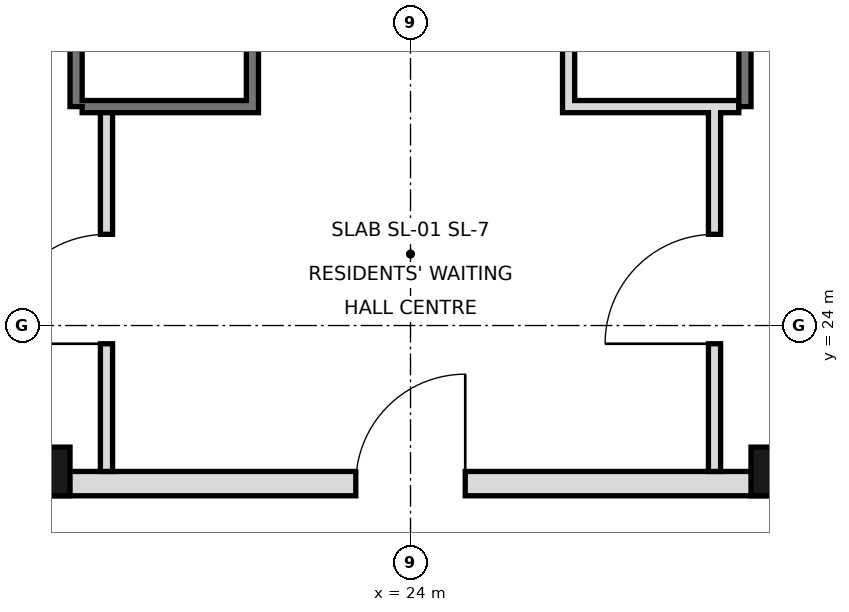
"""IFC4 building model, lengths in metres.
Left out: names, types, materials, properties, quantities, classifications, styles, units other than length and angle.
Written with IfcOpenShell. Run it as: python <this file> out.ifc"""

import sys

from ifc_helpers import new_model, si_unit, direction, frame, frame_2d, origin, origin_2d, place, context, subcontext, project, spatial, rectangle, hollow_rectangle, extrude, element, fill, save


model = new_model("IFC4")
c1 = context("Model", 3, precision=1e-05, world=origin(), true_north=direction((0.0, 1.0)))
c2 = subcontext(c1, "Body", "Model", "MODEL_VIEW")
j1 = project(units=[si_unit("LENGTHUNIT", "METRE"), si_unit("PLANEANGLEUNIT", "RADIAN")], contexts=[c1])
p1 = place(None, origin())
s1 = spatial("IfcSite", under=j1, at=p1, CompositionType="ELEMENT")
p2 = place(p1, origin())
s2 = spatial("IfcBuilding", under=s1, at=p2, CompositionType="ELEMENT")
p3 = place(p2, frame((0.0, 0.0, 85.8)))
s3 = spatial("IfcBuildingStorey", under=s2, at=p3, CompositionType="ELEMENT", Elevation=85.8)
for number, where, z_axis, x_axis in (
    (1, (18.0, 21.6, 0.0), (0.0, 0.0, 1.0), (1.0, 0.0, 0.0)),
    (2, (30.0, 21.6, 0.0), (0.0, 0.0, 1.0), (1.0, 0.0, 0.0)),
):
    element("IfcColumn", number, at=place(p3, frame(where, z_axis=z_axis, x_axis=x_axis)), inside=s3, PredefinedType="COLUMN", context=c2, shape_type="SweptSolid", body=[
        extrude(hollow_rectangle(XDim=0.8, YDim=0.8, WallThickness=0.06, at=origin_2d()), origin(), (0.0, 0.0, 1.0), 4.4),
    ])
for number, where, z_axis, x_axis in (
    (3, (18.5, 27.6, 0.0), (0.0, 0.0, 1.0), (0.0, 1.0, 0.0)),
    (4, (29.5, 27.6, 0.0), (0.0, 0.0, 1.0), (0.0, 1.0, 0.0)),
):
    element("IfcWall", number, at=place(p3, frame(where, z_axis=z_axis, x_axis=x_axis)), inside=s3, PredefinedType="SOLIDWALL", context=c2, shape_type="SweptSolid", body=[
        extrude(rectangle(XDim=17.5, YDim=0.2, at=frame_2d((8.75, 0.0))), origin(), (0.0, 0.0, 1.0), 4.1),
    ])
p4 = place(p3, frame((5.6, 21.4, 0.0), z_axis=(0.0, 0.0, 1.0), x_axis=(1.0, 0.0, 0.0)))
e5 = element("IfcWall", 5, at=p4, inside=s3, PredefinedType="SOLIDWALL", context=c2, shape_type="SweptSolid", body=[
    extrude(rectangle(XDim=36.8, YDim=0.4, at=frame_2d((18.4, 0.0))), origin(), (0.0, 0.0, 1.0), 4.1),
])
p5 = place(p4, frame((8.5, 0.0, 0.0)))
e6 = element("IfcOpeningElement", 6, at=p5, cuts=e5, PredefinedType="OPENING", context=c2, shape_type="SweptSolid", body=[
    extrude(rectangle(XDim=1.8, YDim=2.1, at=frame_2d((0.9, 1.05))), frame((0.0, 0.21, 0.0), z_axis=(0.0, -1.0, 0.0), x_axis=(1.0, 0.0, 0.0)), (0.0, 0.0, 1.0), 0.42),
])
p6 = place(p4, frame((17.5, 0.0, 0.0)))
e7 = element("IfcOpeningElement", 7, at=p6, cuts=e5, PredefinedType="OPENING", context=c2, shape_type="SweptSolid", body=[
    extrude(rectangle(XDim=1.8, YDim=2.1, at=frame_2d((0.9, 1.05))), frame((0.0, 0.21, 0.0), z_axis=(0.0, -1.0, 0.0), x_axis=(1.0, 0.0, 0.0)), (0.0, 0.0, 1.0), 0.42),
])
p7 = place(p4, frame((26.5, 0.0, 0.0)))
e8 = element("IfcOpeningElement", 8, at=p7, cuts=e5, PredefinedType="OPENING", context=c2, shape_type="SweptSolid", body=[
    extrude(rectangle(XDim=1.8, YDim=2.1, at=frame_2d((0.9, 1.05))), frame((0.0, 0.21, 0.0), z_axis=(0.0, -1.0, 0.0), x_axis=(1.0, 0.0, 0.0)), (0.0, 0.0, 1.0), 0.42),
])
p8 = place(p4, frame((4.5, 0.0, 0.0)))
e9 = element("IfcOpeningElement", 9, at=p8, cuts=e5, PredefinedType="OPENING", context=c2, shape_type="SweptSolid", body=[
    extrude(rectangle(XDim=1.2, YDim=2.1, at=frame_2d((0.6, 1.05))), frame((0.0, 0.21, 0.0), z_axis=(0.0, -1.0, 0.0), x_axis=(1.0, 0.0, 0.0)), (0.0, 0.0, 1.0), 0.42),
])
p9 = place(p4, frame((31.1, 0.0, 0.0)))
e10 = element("IfcOpeningElement", 10, at=p9, cuts=e5, PredefinedType="OPENING", context=c2, shape_type="SweptSolid", body=[
    extrude(rectangle(XDim=1.2, YDim=2.1, at=frame_2d((0.6, 1.05))), frame((0.0, 0.21, 0.0), z_axis=(0.0, -1.0, 0.0), x_axis=(1.0, 0.0, 0.0)), (0.0, 0.0, 1.0), 0.42),
])
p10 = place(p3, frame((19.0, 21.6, 0.0), z_axis=(0.0, 0.0, 1.0), x_axis=(0.0, 1.0, 0.0)))
e11 = element("IfcWall", 11, at=p10, inside=s3, PredefinedType="PARTITIONING", context=c2, shape_type="SweptSolid", body=[
    extrude(rectangle(XDim=6.0, YDim=0.2, at=frame_2d((3.0, 0.0))), origin(), (0.0, 0.0, 1.0), 4.1),
])
p11 = place(p10, frame((2.1, 0.0, 0.0)))
e12 = element("IfcOpeningElement", 12, at=p11, cuts=e11, PredefinedType="OPENING", context=c2, shape_type="SweptSolid", body=[
    extrude(rectangle(XDim=1.8, YDim=2.1, at=frame_2d((0.9, 1.05))), frame((0.0, 0.11, 0.0), z_axis=(0.0, -1.0, 0.0), x_axis=(1.0, 0.0, 0.0)), (0.0, 0.0, 1.0), 0.22),
])
p12 = place(p3, frame((29.0, 21.6, 0.0), z_axis=(0.0, 0.0, 1.0), x_axis=(0.0, 1.0, 0.0)))
e13 = element("IfcWall", 13, at=p12, inside=s3, PredefinedType="PARTITIONING", context=c2, shape_type="SweptSolid", body=[
    extrude(rectangle(XDim=6.0, YDim=0.2, at=frame_2d((3.0, 0.0))), origin(), (0.0, 0.0, 1.0), 4.1),
])
p13 = place(p12, frame((2.1, 0.0, 0.0)))
e14 = element("IfcOpeningElement", 14, at=p13, cuts=e13, PredefinedType="OPENING", context=c2, shape_type="SweptSolid", body=[
    extrude(rectangle(XDim=1.8, YDim=2.1, at=frame_2d((0.9, 1.05))), frame((0.0, 0.11, 0.0), z_axis=(0.0, -1.0, 0.0), x_axis=(1.0, 0.0, 0.0)), (0.0, 0.0, 1.0), 0.22),
])
p14 = place(p3, frame((21.4, 27.5, 0.0), z_axis=(0.0, 0.0, 1.0), x_axis=(0.0, 1.0, 0.0)))
e15 = element("IfcWall", 15, at=p14, inside=s3, PredefinedType="SOLIDWALL", context=c2, shape_type="SweptSolid", body=[
    extrude(rectangle(XDim=17.5, YDim=0.2, at=frame_2d((8.75, 0.0))), origin(), (0.0, 0.0, 1.0), 4.1),
])
p15 = place(p14, frame((9.8, 0.0, 0.0)))
e16 = element("IfcOpeningElement", 16, at=p15, cuts=e15, PredefinedType="OPENING", context=c2, shape_type="SweptSolid", body=[
    extrude(rectangle(XDim=1.0, YDim=2.1, at=frame_2d((0.5, 1.05))), frame((0.0, 0.11, 0.0), z_axis=(0.0, -1.0, 0.0), x_axis=(1.0, 0.0, 0.0)), (0.0, 0.0, 1.0), 0.22),
])
p16 = place(p14, frame((7.4, 0.0, 0.0)))
e17 = element("IfcOpeningElement", 17, at=p16, cuts=e15, PredefinedType="OPENING", context=c2, shape_type="SweptSolid", body=[
    extrude(rectangle(XDim=0.9, YDim=2.1, at=frame_2d((0.45, 1.05))), frame((0.0, 0.11, 0.0), z_axis=(0.0, -1.0, 0.0), x_axis=(1.0, 0.0, 0.0)), (0.0, 0.0, 1.0), 0.22),
])
p17 = place(p3, frame((26.6, 27.5, 0.0), z_axis=(0.0, 0.0, 1.0), x_axis=(0.0, 1.0, 0.0)))
e18 = element("IfcWall", 18, at=p17, inside=s3, PredefinedType="SOLIDWALL", context=c2, shape_type="SweptSolid", body=[
    extrude(rectangle(XDim=17.5, YDim=0.2, at=frame_2d((8.75, 0.0))), origin(), (0.0, 0.0, 1.0), 4.1),
])
p18 = place(p17, frame((4.3, 0.0, 0.0)))
e19 = element("IfcOpeningElement", 19, at=p18, cuts=e18, PredefinedType="OPENING", context=c2, shape_type="SweptSolid", body=[
    extrude(rectangle(XDim=0.9, YDim=2.1, at=frame_2d((0.45, 1.05))), frame((0.0, 0.11, 0.0), z_axis=(0.0, -1.0, 0.0), x_axis=(1.0, 0.0, 0.0)), (0.0, 0.0, 1.0), 0.22),
])
p19 = place(p17, frame((10.35, 0.0, 0.0)))
e20 = element("IfcOpeningElement", 20, at=p19, cuts=e18, PredefinedType="OPENING", context=c2, shape_type="SweptSolid", body=[
    extrude(rectangle(XDim=1.0, YDim=2.1, at=frame_2d((0.5, 1.05))), frame((0.0, 0.11, 0.0), z_axis=(0.0, -1.0, 0.0), x_axis=(1.0, 0.0, 0.0)), (0.0, 0.0, 1.0), 0.22),
])
p20 = place(p17, frame((15.475, 0.0, 0.0)))
e21 = element("IfcOpeningElement", 21, at=p20, cuts=e18, PredefinedType="OPENING", context=c2, shape_type="SweptSolid", body=[
    extrude(rectangle(XDim=1.0, YDim=2.1, at=frame_2d((0.5, 1.05))), frame((0.0, 0.11, 0.0), z_axis=(0.0, -1.0, 0.0), x_axis=(1.0, 0.0, 0.0)), (0.0, 0.0, 1.0), 0.22),
])
for number, where, z_axis, x_axis in (
    (22, (18.6, 27.6, 0.0), (0.0, 0.0, 1.0), (1.0, 0.0, 0.0)),
    (23, (26.7, 27.6, 0.0), (0.0, 0.0, 1.0), (1.0, 0.0, 0.0)),
):
    element("IfcWall", number, at=place(p3, frame(where, z_axis=z_axis, x_axis=x_axis)), inside=s3, PredefinedType="SOLIDWALL", context=c2, shape_type="SweptSolid", body=[
        extrude(rectangle(XDim=2.7, YDim=0.2, at=frame_2d((1.35, 0.0))), origin(), (0.0, 0.0, 1.0), 4.1),
    ])
p21 = place(p11, origin())
e24 = element("IfcDoor", 24, at=p21, inside=s3, OperationType="SINGLE_SWING_LEFT", PredefinedType="DOOR", context=c2, shape_type="SweptSolid", body=[
    extrude(rectangle(XDim=1.8, YDim=2.1, at=frame_2d((0.9, 1.05))), frame((0.0, 0.025, 0.0), z_axis=(0.0, -1.0, 0.0), x_axis=(1.0, 0.0, 0.0)), (0.0, 0.0, 1.0), 0.05),
])
fill(e12, e24)
p22 = place(p6, frame((1.8, 0.0, 0.0), z_axis=(0.0, 0.0, 1.0), x_axis=(-1.0, 0.0, 0.0)))
e25 = element("IfcDoor", 25, at=p22, inside=s3, OperationType="SINGLE_SWING_LEFT", PredefinedType="DOOR", context=c2, shape_type="SweptSolid", body=[
    extrude(rectangle(XDim=1.8, YDim=2.1, at=frame_2d((0.9, 1.05))), frame((0.0, 0.025, 0.0), z_axis=(0.0, -1.0, 0.0), x_axis=(1.0, 0.0, 0.0)), (0.0, 0.0, 1.0), 0.05),
])
fill(e7, e25)
p23 = place(p13, origin())
e26 = element("IfcDoor", 26, at=p23, inside=s3, OperationType="SINGLE_SWING_LEFT", PredefinedType="DOOR", context=c2, shape_type="SweptSolid", body=[
    extrude(rectangle(XDim=1.8, YDim=2.1, at=frame_2d((0.9, 1.05))), frame((0.0, 0.025, 0.0), z_axis=(0.0, -1.0, 0.0), x_axis=(1.0, 0.0, 0.0)), (0.0, 0.0, 1.0), 0.05),
])
fill(e14, e26)
save(model, sys.argv[1])
